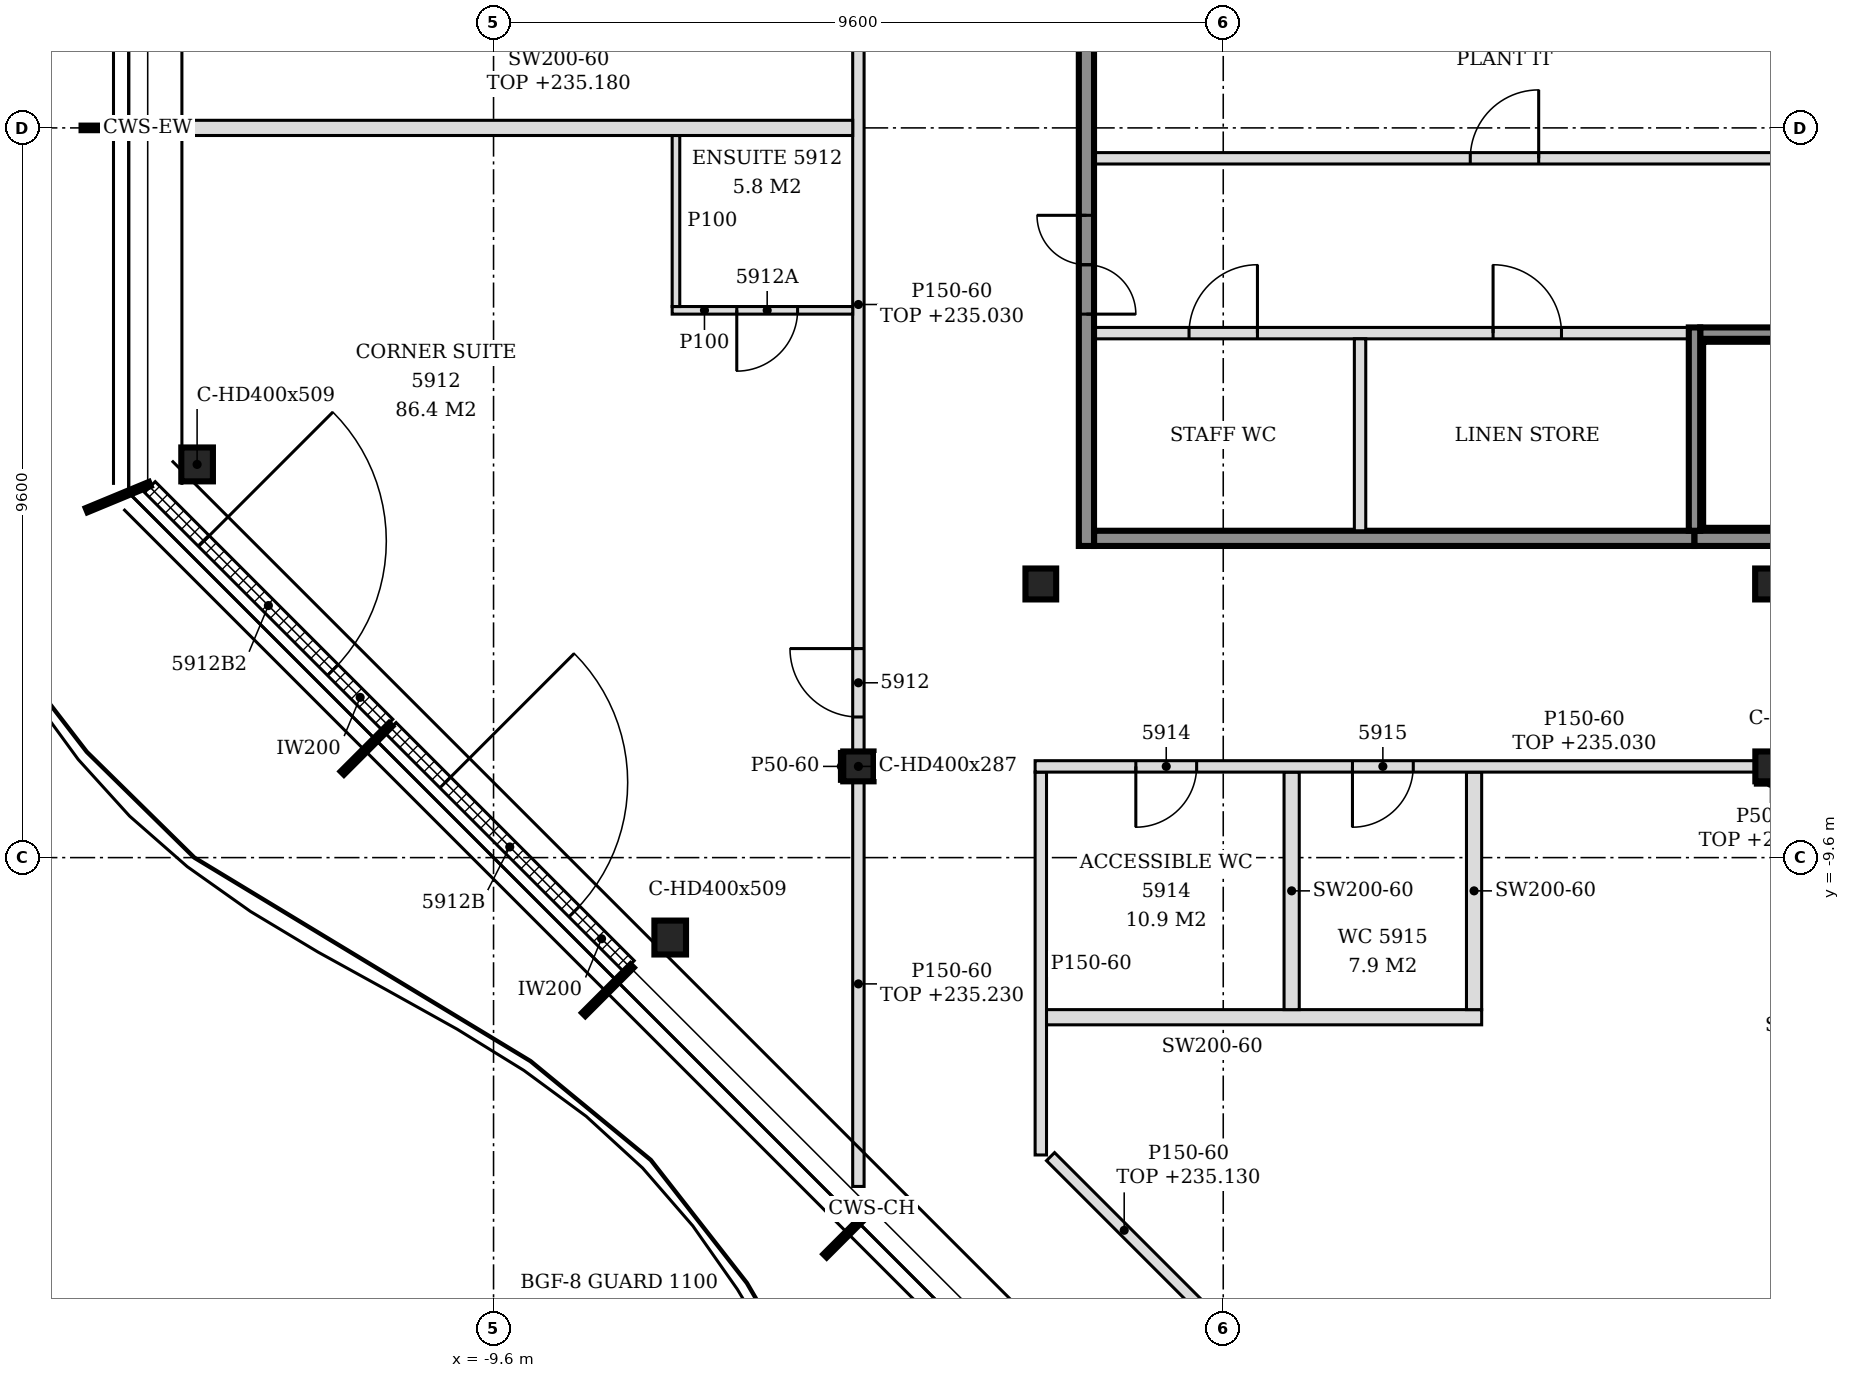
"""IFC4 building model, lengths in metres.
Left out: names, types, materials, properties, quantities, classifications, styles, units other than length and angle.
Written with IfcOpenShell. Run it as: python <this file> out.ifc"""

import sys

from ifc_helpers import new_model, si_unit, direction, frame, frame_2d, origin, origin_2d, place, context, subcontext, project, spatial, polyline, rectangle, i_section, outline, extrude, element, fill, save


model = new_model("IFC4")
c1 = context("Model", 3, precision=1e-05, world=origin(), true_north=direction((0.0, 1.0)))
c2 = subcontext(c1, "Body", "Model", "MODEL_VIEW")
j1 = project(units=[si_unit("LENGTHUNIT", "METRE"), si_unit("PLANEANGLEUNIT", "RADIAN")], contexts=[c1])
p1 = place(None, origin())
s1 = spatial("IfcSite", under=j1, at=p1, CompositionType="ELEMENT")
p2 = place(p1, origin())
s2 = spatial("IfcBuilding", under=s1, at=p2, CompositionType="ELEMENT")
p3 = place(p2, frame((0.0, 0.0, 232.2)))
s3 = spatial("IfcBuildingStorey", under=s2, at=p3, CompositionType="ELEMENT", Elevation=232.2)
for number, where, z_axis, x_axis in (
    (1, (-13.5, -4.427, -0.15), (0.0, 0.0, 1.0), (1.0, 0.0, 0.0)),
    (2, (-7.276, -10.652, -0.15), (0.0, 0.0, 1.0), (1.0, 0.0, 0.0)),
):
    element("IfcColumn", number, at=place(p3, frame(where, z_axis=z_axis, x_axis=x_axis)), inside=s3, PredefinedType="COLUMN", context=c2, shape_type="SweptSolid", body=[
        extrude(i_section(OverallWidth=0.416, OverallDepth=0.446, WebThickness=0.039, FlangeThickness=0.063, FilletRadius=0.015, at=origin_2d()), origin(), (0.0, 0.0, 1.0), 3.6),
    ])
for number, where, z_axis, x_axis in (
    (3, (-4.8, -8.4, -0.15), (0.0, 0.0, 1.0), (1.0, 0.0, 0.0)),
    (4, (7.2, -8.4, -0.15), (0.0, 0.0, 1.0), (1.0, 0.0, 0.0)),
):
    element("IfcColumn", number, at=place(p3, frame(where, z_axis=z_axis, x_axis=x_axis)), inside=s3, PredefinedType="COLUMN", context=c2, shape_type="SweptSolid", body=[
        extrude(i_section(OverallWidth=0.399, OverallDepth=0.393, WebThickness=0.023, FlangeThickness=0.037, FilletRadius=0.015, at=origin_2d()), origin(), (0.0, 0.0, 1.0), 3.6),
    ])
for number, where, z_axis, x_axis in (
    (5, (-2.4, -6.0, -0.15), (0.0, 0.0, 1.0), (1.0, 0.0, 0.0)),
    (6, (7.2, -6.0, -0.15), (0.0, 0.0, 1.0), (1.0, 0.0, 0.0)),
):
    element("IfcColumn", number, at=place(p3, frame(where, z_axis=z_axis, x_axis=x_axis)), inside=s3, PredefinedType="COLUMN", context=c2, shape_type="SweptSolid", body=[
        extrude(i_section(OverallWidth=0.404, OverallDepth=0.407, WebThickness=0.027, FlangeThickness=0.044, FilletRadius=0.015, at=origin_2d()), origin(), (0.0, 0.0, 1.0), 3.6),
    ])
p4 = place(p3, frame((-14.122, -4.725, 0.0), z_axis=(0.0, 0.0, 1.0), x_axis=(0.707106781187, -0.707106781187, 0.0)))
e7 = element("IfcWall", 7, at=p4, inside=s3, PredefinedType="NOTDEFINED", context=c2, shape_type="SweptSolid", body=[
    extrude(rectangle(XDim=4.421, YDim=0.2, at=frame_2d((2.21, 0.0))), origin(), (0.0, 0.0, 1.0), 3.45),
])
p5 = place(p4, frame((1.005, 0.0, 0.0)))
e8 = element("IfcOpeningElement", 8, at=p5, cuts=e7, PredefinedType="OPENING", context=c2, shape_type="SweptSolid", body=[
    extrude(rectangle(XDim=2.4, YDim=2.4, at=frame_2d((1.2, 1.2))), frame((0.0, 0.11, 0.0), z_axis=(0.0, -1.0, 0.0), x_axis=(1.0, 0.0, 0.0)), (0.0, 0.0, 1.0), 0.22),
])
p6 = place(p3, frame((-10.953, -7.893, 0.0), z_axis=(0.0, 0.0, 1.0), x_axis=(0.707106781187, -0.707106781187, 0.0)))
e9 = element("IfcWall", 9, at=p6, inside=s3, PredefinedType="NOTDEFINED", context=c2, shape_type="SweptSolid", body=[
    extrude(rectangle(XDim=4.431, YDim=0.2, at=frame_2d((2.215, 0.0))), origin(), (0.0, 0.0, 1.0), 3.45),
])
p7 = place(p6, frame((1.015, 0.0, 0.0)))
e10 = element("IfcOpeningElement", 10, at=p7, cuts=e9, PredefinedType="OPENING", context=c2, shape_type="SweptSolid", body=[
    extrude(rectangle(XDim=2.4, YDim=2.4, at=frame_2d((1.2, 1.2))), frame((0.0, 0.11, 0.0), z_axis=(0.0, -1.0, 0.0), x_axis=(1.0, 0.0, 0.0)), (0.0, 0.0, 1.0), 0.22),
])
p8 = place(p3, frame((-1.7, -5.4, 0.0), z_axis=(0.0, 0.0, 1.0), x_axis=(1.0, 0.0, 0.0)))
e11 = element("IfcWall", 11, at=p8, inside=s3, PredefinedType="SOLIDWALL", context=c2, shape_type="SweptSolid", body=[
    extrude(rectangle(XDim=7.9, YDim=0.2, at=frame_2d((3.95, 0.0))), origin(), (0.0, 0.0, 1.0), 3.45),
])
p9 = place(p3, frame((6.2, -5.4, 0.0), z_axis=(0.0, 0.0, 1.0), x_axis=(1.0, 0.0, 0.0)))
e12 = element("IfcWall", 12, at=p9, inside=s3, PredefinedType="SOLIDWALL", context=c2, shape_type="SweptSolid", body=[
    extrude(rectangle(XDim=6.5, YDim=0.2, at=frame_2d((3.25, 0.0))), origin(), (0.0, 0.0, 1.0), 3.45),
])
p10 = place(p3, frame((-1.7, -2.7, 0.0), z_axis=(0.0, 0.0, 1.0), x_axis=(1.0, 0.0, 0.0)))
e13 = element("IfcWall", 13, at=p10, inside=s3, PredefinedType="PARTITIONING", context=c2, shape_type="SweptSolid", body=[
    extrude(rectangle(XDim=7.825, YDim=0.15, at=frame_2d((3.913, 0.0))), origin(), (0.0, 0.0, 1.0), 3.45),
])
p11 = place(p10, frame((1.25, 0.0, 0.0)))
e14 = element("IfcOpeningElement", 14, at=p11, cuts=e13, PredefinedType="OPENING", context=c2, shape_type="SweptSolid", body=[
    extrude(rectangle(XDim=0.9, YDim=2.1, at=frame_2d((0.45, 1.05))), frame((0.0, 0.085, 0.0), z_axis=(0.0, -1.0, 0.0), x_axis=(1.0, 0.0, 0.0)), (0.0, 0.0, 1.0), 0.17),
])
p12 = place(p10, frame((5.25, 0.0, 0.0)))
e15 = element("IfcOpeningElement", 15, at=p12, cuts=e13, PredefinedType="OPENING", context=c2, shape_type="SweptSolid", body=[
    extrude(rectangle(XDim=0.9, YDim=2.1, at=frame_2d((0.45, 1.05))), frame((0.0, 0.085, 0.0), z_axis=(0.0, -1.0, 0.0), x_axis=(1.0, 0.0, 0.0)), (0.0, 0.0, 1.0), 0.17),
])
p13 = place(p3, frame((6.275, -2.7, 0.0), z_axis=(0.0, 0.0, 1.0), x_axis=(1.0, 0.0, 0.0)))
e16 = element("IfcWall", 16, at=p13, inside=s3, PredefinedType="SOLIDWALL", context=c2, shape_type="SweptSolid", body=[
    extrude(rectangle(XDim=6.35, YDim=0.15, at=frame_2d((3.175, 0.0))), origin(), (0.0, 0.0, 1.0), 3.45),
])
p14 = place(p13, frame((5.225, 0.0, 0.0)))
e17 = element("IfcOpeningElement", 17, at=p14, cuts=e16, PredefinedType="OPENING", context=c2, shape_type="SweptSolid", body=[
    extrude(rectangle(XDim=1.0, YDim=2.1, at=frame_2d((0.5, 1.05))), frame((0.0, 0.085, 0.0), z_axis=(0.0, -1.0, 0.0), x_axis=(1.0, 0.0, 0.0)), (0.0, 0.0, 1.0), 0.17),
])
p15 = place(p3, frame((-1.7, -0.4, 0.0), z_axis=(0.0, 0.0, 1.0), x_axis=(1.0, 0.0, 0.0)))
e18 = element("IfcWall", 18, at=p15, inside=s3, PredefinedType="PARTITIONING", context=c2, shape_type="SweptSolid", body=[
    extrude(rectangle(XDim=10.825, YDim=0.15, at=frame_2d((5.413, 0.0))), origin(), (0.0, 0.0, 1.0), 3.45),
])
p16 = place(p15, frame((4.95, 0.0, 0.0)))
e19 = element("IfcOpeningElement", 19, at=p16, cuts=e18, PredefinedType="OPENING", context=c2, shape_type="SweptSolid", body=[
    extrude(rectangle(XDim=0.9, YDim=2.1, at=frame_2d((0.45, 1.05))), frame((0.0, 0.085, 0.0), z_axis=(0.0, -1.0, 0.0), x_axis=(1.0, 0.0, 0.0)), (0.0, 0.0, 1.0), 0.17),
])
p17 = place(p3, frame((-1.8, -5.5, 0.0), z_axis=(0.0, 0.0, 1.0), x_axis=(0.0, 1.0, 0.0)))
e20 = element("IfcWall", 20, at=p17, inside=s3, PredefinedType="SOLIDWALL", context=c2, shape_type="SweptSolid", body=[
    extrude(rectangle(XDim=15.8, YDim=0.2, at=frame_2d((7.9, 0.0))), origin(), (0.0, 0.0, 1.0), 3.45),
])
p18 = place(p17, frame((3.05, 0.0, 0.0)))
e21 = element("IfcOpeningElement", 21, at=p18, cuts=e20, PredefinedType="OPENING", context=c2, shape_type="SweptSolid", body=[
    extrude(rectangle(XDim=1.3, YDim=2.1, at=frame_2d((0.65, 1.05))), frame((0.0, 0.11, 0.0), z_axis=(0.0, -1.0, 0.0), x_axis=(1.0, 0.0, 0.0)), (0.0, 0.0, 1.0), 0.22),
])
p19 = place(p17, frame((11.45, 0.0, 0.0)))
e22 = element("IfcOpeningElement", 22, at=p19, cuts=e20, PredefinedType="OPENING", context=c2, shape_type="SweptSolid", body=[
    extrude(rectangle(XDim=1.3, YDim=2.1, at=frame_2d((0.65, 1.05))), frame((0.0, 0.11, 0.0), z_axis=(0.0, -1.0, 0.0), x_axis=(1.0, 0.0, 0.0)), (0.0, 0.0, 1.0), 0.22),
])
p20 = place(p3, frame((1.8, -5.3, 0.0), z_axis=(0.0, 0.0, 1.0), x_axis=(0.0, 1.0, 0.0)))
e23 = element("IfcWall", 23, at=p20, inside=s3, PredefinedType="PARTITIONING", context=c2, shape_type="SweptSolid", body=[
    extrude(rectangle(XDim=2.525, YDim=0.15, at=frame_2d((1.263, 0.0))), origin(), (0.0, 0.0, 1.0), 3.45),
])
p21 = place(p3, frame((6.2, -5.3, 0.0), z_axis=(0.0, 0.0, 1.0), x_axis=(0.0, 1.0, 0.0)))
e24 = element("IfcWall", 24, at=p21, inside=s3, PredefinedType="SOLIDWALL", context=c2, shape_type="SweptSolid", body=[
    extrude(rectangle(XDim=2.675, YDim=0.15, at=frame_2d((1.337, 0.0))), origin(), (0.0, 0.0, 1.0), 3.45),
])
p22 = place(p3, frame((-0.334, -15.472, 0.0), z_axis=(0.0, 0.0, 1.0), x_axis=(-0.707106781187, 0.707106781187, 0.0)))
e25 = element("IfcWall", 25, at=p22, inside=s3, PredefinedType="PARTITIONING", context=c2, shape_type="SweptSolid", body=[
    extrude(rectangle(XDim=2.741, YDim=0.15, at=frame_2d((1.37, 0.0))), origin(), (0.0, 0.0, 1.0), 2.93),
])
p23 = place(p3, frame((-4.8, -13.926, 0.0), z_axis=(0.0, 0.0, 1.0), x_axis=(0.0, 1.0, 0.0)))
e26 = element("IfcWall", 26, at=p23, inside=s3, PredefinedType="PARTITIONING", context=c2, shape_type="SweptSolid", body=[
    extrude(outline(polyline([(0.0, 0.0), (5.33, 0.0), (5.33, 3.03), (1.369, 3.03), (1.367, 2.63), (0.229, 2.63), (0.227, 3.03), (0.0, 3.03), (0.0, 0.0)])), frame((0.0, 0.075, 0.0), z_axis=(0.0, -1.0, 0.0), x_axis=(1.0, 0.0, 0.0)), (0.0, 0.0, 1.0), 0.15),
])
p24 = place(p3, frame((-2.4, -13.512, 0.0), z_axis=(0.0, 0.0, 1.0), x_axis=(0.0, 1.0, 0.0)))
e27 = element("IfcWall", 27, at=p24, inside=s3, PredefinedType="PARTITIONING", context=c2, shape_type="SweptSolid", body=[
    extrude(outline(polyline([(0.0, 0.0), (5.037, 0.0), (5.037, 2.83), (4.962, 2.83), (4.96, 3.45), (0.0, 3.45), (0.0, 0.0)])), frame((0.0, 0.075, 0.0), z_axis=(0.0, -1.0, 0.0), x_axis=(1.0, 0.0, 0.0)), (0.0, 0.0, 1.0), 0.15),
])
p25 = place(p3, frame((-2.325, -11.7, 0.0), z_axis=(0.0, 0.0, 1.0), x_axis=(1.0, 0.0, 0.0)))
e28 = element("IfcWall", 28, at=p25, inside=s3, PredefinedType="PARTITIONING", context=c2, shape_type="SweptSolid", body=[
    extrude(rectangle(XDim=5.725, YDim=0.2, at=frame_2d((2.862, 0.0))), origin(), (0.0, 0.0, 1.0), 3.45),
])
for number, where, z_axis, x_axis in (
    (29, (0.9, -11.6, 0.0), (0.0, 0.0, 1.0), (0.0, 1.0, 0.0)),
    (30, (3.3, -11.6, 0.0), (0.0, 0.0, 1.0), (0.0, 1.0, 0.0)),
):
    element("IfcWall", number, at=place(p3, frame(where, z_axis=z_axis, x_axis=x_axis)), inside=s3, PredefinedType="PARTITIONING", context=c2, shape_type="SweptSolid", body=[
        extrude(outline(polyline([(0.0, 0.0), (3.125, 0.0), (3.125, 2.83), (3.05, 2.83), (3.048, 3.45), (0.0, 3.45), (0.0, 0.0)])), frame((0.0, 0.1, 0.0), z_axis=(0.0, -1.0, 0.0), x_axis=(1.0, 0.0, 0.0)), (0.0, 0.0, 1.0), 0.2),
    ])
p26 = place(p3, frame((-2.475, -8.4, 0.0), z_axis=(0.0, 0.0, 1.0), x_axis=(1.0, 0.0, 0.0)))
e31 = element("IfcWall", 31, at=p26, inside=s3, PredefinedType="PARTITIONING", context=c2, shape_type="SweptSolid", body=[
    extrude(rectangle(XDim=9.476, YDim=0.15, at=frame_2d((4.738, 0.0))), origin(), (0.0, 0.0, 1.0), 2.83),
])
p27 = place(p26, frame((1.325, 0.0, 0.0)))
e32 = element("IfcOpeningElement", 32, at=p27, cuts=e31, PredefinedType="OPENING", context=c2, shape_type="SweptSolid", body=[
    extrude(rectangle(XDim=0.8, YDim=2.1, at=frame_2d((0.4, 1.05))), frame((0.0, 0.085, 0.0), z_axis=(0.0, -1.0, 0.0), x_axis=(1.0, 0.0, 0.0)), (0.0, 0.0, 1.0), 0.17),
])
p28 = place(p26, frame((4.175, 0.0, 0.0)))
e33 = element("IfcOpeningElement", 33, at=p28, cuts=e31, PredefinedType="OPENING", context=c2, shape_type="SweptSolid", body=[
    extrude(rectangle(XDim=0.8, YDim=2.1, at=frame_2d((0.4, 1.05))), frame((0.0, 0.085, 0.0), z_axis=(0.0, -1.0, 0.0), x_axis=(1.0, 0.0, 0.0)), (0.0, 0.0, 1.0), 0.17),
])
p29 = place(p3, frame((-4.8, -8.204, 0.0), z_axis=(0.0, 0.0, 1.0), x_axis=(0.0, 1.0, 0.0)))
e34 = element("IfcWall", 34, at=p29, inside=s3, PredefinedType="PARTITIONING", context=c2, shape_type="SweptSolid", body=[
    extrude(rectangle(XDim=10.407, YDim=0.15, at=frame_2d((5.204, 0.0))), origin(), (0.0, 0.0, 1.0), 2.83),
])
p30 = place(p29, frame((0.454, 0.0, 0.0)))
e35 = element("IfcOpeningElement", 35, at=p30, cuts=e34, PredefinedType="OPENING", context=c2, shape_type="SweptSolid", body=[
    extrude(rectangle(XDim=0.9, YDim=2.1, at=frame_2d((0.45, 1.05))), frame((0.0, 0.085, 0.0), z_axis=(0.0, -1.0, 0.0), x_axis=(1.0, 0.0, 0.0)), (0.0, 0.0, 1.0), 0.17),
])
p31 = place(p3, frame((-7.25, -2.4, 0.0), z_axis=(0.0, 0.0, 1.0), x_axis=(1.0, 0.0, 0.0)))
e36 = element("IfcWall", 36, at=p31, inside=s3, PredefinedType="PARTITIONING", context=c2, shape_type="SweptSolid", body=[
    extrude(outline(polyline([(0.0, 0.0), (2.375, 0.0), (2.375, 2.83), (2.3, 2.83), (2.298, 3.45), (0.0, 3.45), (0.0, 0.0)])), frame((0.0, 0.05, 0.0), z_axis=(0.0, -1.0, 0.0), x_axis=(1.0, 0.0, 0.0)), (0.0, 0.0, 1.0), 0.1),
])
p32 = place(p31, frame((0.85, 0.0, 0.0)))
e37 = element("IfcOpeningElement", 37, at=p32, cuts=e36, PredefinedType="OPENING", context=c2, shape_type="SweptSolid", body=[
    extrude(rectangle(XDim=0.8, YDim=2.1, at=frame_2d((0.4, 1.05))), frame((0.0, 0.06, 0.0), z_axis=(0.0, -1.0, 0.0), x_axis=(1.0, 0.0, 0.0)), (0.0, 0.0, 1.0), 0.12),
])
p33 = place(p3, frame((-7.2, -2.35, 0.0), z_axis=(0.0, 0.0, 1.0), x_axis=(0.0, 1.0, 0.0)))
e38 = element("IfcWall", 38, at=p33, inside=s3, PredefinedType="PARTITIONING", context=c2, shape_type="SweptSolid", body=[
    extrude(rectangle(XDim=2.25, YDim=0.1, at=frame_2d((1.125, 0.0))), origin(), (0.0, 0.0, 1.0), 3.45),
])
p34 = place(p3, frame((-14.09, 0.0, 0.0), z_axis=(0.0, 0.0, 1.0), x_axis=(1.0, 0.0, 0.0)))
e39 = element("IfcWall", 39, at=p34, inside=s3, PredefinedType="PARTITIONING", context=c2, shape_type="SweptSolid", body=[
    extrude(outline(polyline([(0.0, 0.0), (9.215, 0.0), (9.215, 2.83), (9.14, 2.83), (9.138, 2.98), (0.74, 2.98), (0.738, 2.93), (0.44, 2.93), (0.438, 2.98), (0.0, 2.98), (0.0, 0.0)])), frame((0.0, 0.1, 0.0), z_axis=(0.0, -1.0, 0.0), x_axis=(1.0, 0.0, 0.0)), (0.0, 0.0, 1.0), 0.2),
])
p35 = place(p3, frame((-5.024, -8.596, 0.0), z_axis=(0.0, 0.0, 1.0), x_axis=(0.0, 1.0, 0.0)))
e40 = element("IfcWall", 40, at=p35, inside=s3, PredefinedType="PARTITIONING", context=c2, shape_type="SweptSolid", body=[
    extrude(rectangle(XDim=0.393, YDim=0.05, at=frame_2d((0.196, 0.0))), origin(), (0.0, 0.0, 1.0), 3.45),
])
p36 = place(p3, frame((7.0, -8.622, 0.0), z_axis=(0.0, 0.0, 1.0), x_axis=(1.0, 0.0, 0.0)))
e41 = element("IfcWall", 41, at=p36, inside=s3, PredefinedType="PARTITIONING", context=c2, shape_type="SweptSolid", body=[
    extrude(rectangle(XDim=0.399, YDim=0.05, at=frame_2d((0.199, 0.0))), origin(), (0.0, 0.0, 1.0), 2.73),
])
p37 = place(p5, origin())
e42 = element("IfcDoor", 42, at=p37, inside=s3, OperationType="SINGLE_SWING_LEFT", PredefinedType="DOOR", context=c2, shape_type="SweptSolid", body=[
    extrude(rectangle(XDim=2.4, YDim=2.4, at=frame_2d((1.2, 1.2))), frame((0.0, 0.025, 0.0), z_axis=(0.0, -1.0, 0.0), x_axis=(1.0, 0.0, 0.0)), (0.0, 0.0, 1.0), 0.05),
])
fill(e8, e42)
p38 = place(p7, origin())
e43 = element("IfcDoor", 43, at=p38, inside=s3, OperationType="SINGLE_SWING_LEFT", PredefinedType="DOOR", context=c2, shape_type="SweptSolid", body=[
    extrude(rectangle(XDim=2.4, YDim=2.4, at=frame_2d((1.2, 1.2))), frame((0.0, 0.025, 0.0), z_axis=(0.0, -1.0, 0.0), x_axis=(1.0, 0.0, 0.0)), (0.0, 0.0, 1.0), 0.05),
])
fill(e10, e43)
p39 = place(p18, origin())
e44 = element("IfcDoor", 44, at=p39, inside=s3, OperationType="DOUBLE_DOOR_SINGLE_SWING", PredefinedType="DOOR", context=c2, shape_type="SweptSolid", body=[
    extrude(rectangle(XDim=1.3, YDim=2.1, at=frame_2d((0.65, 1.05))), frame((0.0, 0.025, 0.0), z_axis=(0.0, -1.0, 0.0), x_axis=(1.0, 0.0, 0.0)), (0.0, 0.0, 1.0), 0.05),
])
fill(e21, e44)
p40 = place(p11, origin())
e45 = element("IfcDoor", 45, at=p40, inside=s3, OperationType="SINGLE_SWING_RIGHT", PredefinedType="DOOR", context=c2, shape_type="SweptSolid", body=[
    extrude(rectangle(XDim=0.9, YDim=2.1, at=frame_2d((0.45, 1.05))), frame((0.0, 0.025, 0.0), z_axis=(0.0, -1.0, 0.0), x_axis=(1.0, 0.0, 0.0)), (0.0, 0.0, 1.0), 0.05),
])
fill(e14, e45)
p41 = place(p12, origin())
e46 = element("IfcDoor", 46, at=p41, inside=s3, OperationType="SINGLE_SWING_LEFT", PredefinedType="DOOR", context=c2, shape_type="SweptSolid", body=[
    extrude(rectangle(XDim=0.9, YDim=2.1, at=frame_2d((0.45, 1.05))), frame((0.0, 0.025, 0.0), z_axis=(0.0, -1.0, 0.0), x_axis=(1.0, 0.0, 0.0)), (0.0, 0.0, 1.0), 0.05),
])
fill(e15, e46)
p42 = place(p16, origin())
e47 = element("IfcDoor", 47, at=p42, inside=s3, OperationType="SINGLE_SWING_RIGHT", PredefinedType="DOOR", context=c2, shape_type="SweptSolid", body=[
    extrude(rectangle(XDim=0.9, YDim=2.1, at=frame_2d((0.45, 1.05))), frame((0.0, 0.025, 0.0), z_axis=(0.0, -1.0, 0.0), x_axis=(1.0, 0.0, 0.0)), (0.0, 0.0, 1.0), 0.05),
])
fill(e19, e47)
p43 = place(p30, origin())
e48 = element("IfcDoor", 48, at=p43, inside=s3, OperationType="SINGLE_SWING_RIGHT", PredefinedType="DOOR", context=c2, shape_type="SweptSolid", body=[
    extrude(rectangle(XDim=0.9, YDim=2.1, at=frame_2d((0.45, 1.05))), frame((0.0, 0.025, 0.0), z_axis=(0.0, -1.0, 0.0), x_axis=(1.0, 0.0, 0.0)), (0.0, 0.0, 1.0), 0.05),
])
fill(e35, e48)
p44 = place(p32, frame((0.8, 0.0, 0.0), z_axis=(0.0, 0.0, 1.0), x_axis=(-1.0, 0.0, 0.0)))
e49 = element("IfcDoor", 49, at=p44, inside=s3, OperationType="SINGLE_SWING_RIGHT", PredefinedType="DOOR", context=c2, shape_type="SweptSolid", body=[
    extrude(rectangle(XDim=0.8, YDim=2.1, at=frame_2d((0.4, 1.05))), frame((0.0, 0.025, 0.0), z_axis=(0.0, -1.0, 0.0), x_axis=(1.0, 0.0, 0.0)), (0.0, 0.0, 1.0), 0.05),
])
fill(e37, e49)
p45 = place(p27, frame((0.8, 0.0, 0.0), z_axis=(0.0, 0.0, 1.0), x_axis=(-1.0, 0.0, 0.0)))
e50 = element("IfcDoor", 50, at=p45, inside=s3, OperationType="SINGLE_SWING_RIGHT", PredefinedType="DOOR", context=c2, shape_type="SweptSolid", body=[
    extrude(rectangle(XDim=0.8, YDim=2.1, at=frame_2d((0.4, 1.05))), frame((0.0, 0.025, 0.0), z_axis=(0.0, -1.0, 0.0), x_axis=(1.0, 0.0, 0.0)), (0.0, 0.0, 1.0), 0.05),
])
fill(e32, e50)
p46 = place(p28, frame((0.8, 0.0, 0.0), z_axis=(0.0, 0.0, 1.0), x_axis=(-1.0, 0.0, 0.0)))
e51 = element("IfcDoor", 51, at=p46, inside=s3, OperationType="SINGLE_SWING_RIGHT", PredefinedType="DOOR", context=c2, shape_type="SweptSolid", body=[
    extrude(rectangle(XDim=0.8, YDim=2.1, at=frame_2d((0.4, 1.05))), frame((0.0, 0.025, 0.0), z_axis=(0.0, -1.0, 0.0), x_axis=(1.0, 0.0, 0.0)), (0.0, 0.0, 1.0), 0.05),
])
fill(e33, e51)
save(model, sys.argv[1])
